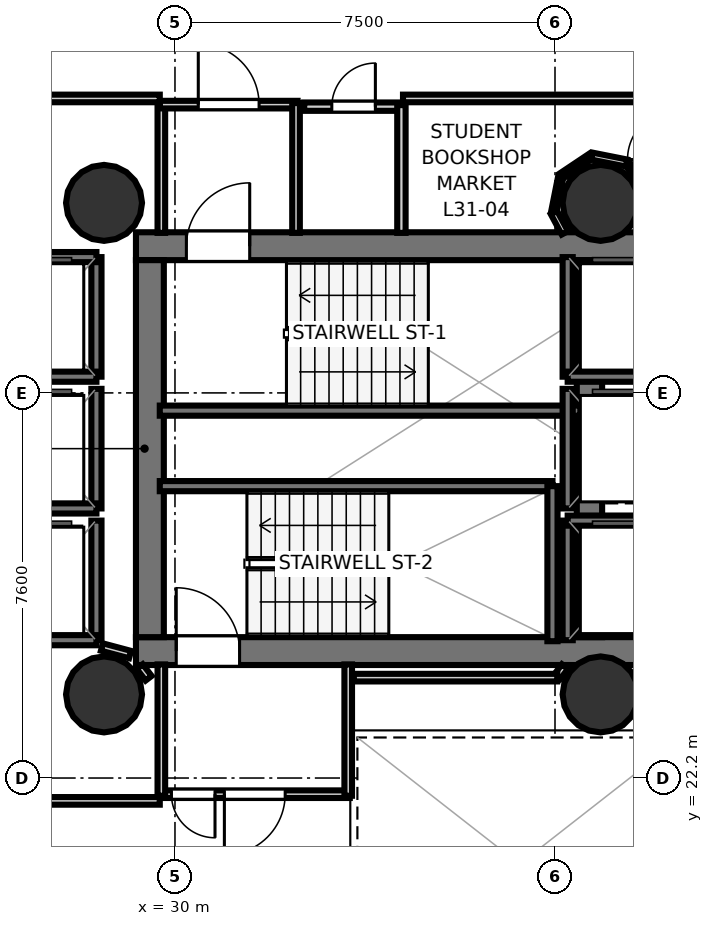
"""IFC4 building model, lengths in metres.
Left out: names, types, materials, properties, quantities, classifications, styles, units other than length and angle.
Written with IfcOpenShell. Run it as: python <this file> out.ifc"""

import sys

from ifc_helpers import new_model, si_unit, direction, frame, frame_2d, origin, origin_2d, place, context, subcontext, project, spatial, rectangle, hollow_circle, extrude, element, fill, save


model = new_model("IFC4")
c1 = context("Model", 3, precision=1e-05, world=origin(), true_north=direction((0.0, 1.0)))
c2 = subcontext(c1, "Body", "Model", "MODEL_VIEW")
j1 = project(units=[si_unit("LENGTHUNIT", "METRE"), si_unit("PLANEANGLEUNIT", "RADIAN")], contexts=[c1])
p1 = place(None, origin())
s1 = spatial("IfcSite", under=j1, at=p1, CompositionType="ELEMENT")
p2 = place(p1, origin())
s2 = spatial("IfcBuilding", under=s1, at=p2, CompositionType="ELEMENT")
p3 = place(p2, frame((0.0, 0.0, 123.7)))
s3 = spatial("IfcBuildingStorey", under=s2, at=p3, CompositionType="ELEMENT", Elevation=123.7)
p4 = place(p3, frame((29.23, 32.695, 0.0), z_axis=(0.0, 0.0, 1.0), x_axis=(1.0, 0.0, 0.0)))
e1 = element("IfcWall", 1, at=p4, inside=s3, PredefinedType="SHEAR", context=c2, shape_type="SweptSolid", body=[
    extrude(rectangle(XDim=10.62, YDim=0.55, at=frame_2d((5.31, 0.0))), origin(), (0.0, 0.0, 1.0), 3.52),
])
p5 = place(p4, frame((0.995, 0.0, 0.0)))
e2 = element("IfcOpeningElement", 2, at=p5, cuts=e1, PredefinedType="OPENING", context=c2, shape_type="SweptSolid", body=[
    extrude(rectangle(XDim=1.25, YDim=2.15, at=frame_2d((0.625, 1.075))), frame((0.0, 0.285, 0.0), z_axis=(0.0, -1.0, 0.0), x_axis=(1.0, 0.0, 0.0)), (0.0, 0.0, 1.0), 0.57),
])
p6 = place(p3, frame((29.23, 24.705, 0.0), z_axis=(0.0, 0.0, 1.0), x_axis=(1.0, 0.0, 0.0)))
e3 = element("IfcWall", 3, at=p6, inside=s3, PredefinedType="SHEAR", context=c2, shape_type="SweptSolid", body=[
    extrude(rectangle(XDim=10.62, YDim=0.55, at=frame_2d((5.31, 0.0))), origin(), (0.0, 0.0, 1.0), 3.52),
])
p7 = place(p6, frame((0.795, 0.0, 0.0)))
e4 = element("IfcOpeningElement", 4, at=p7, cuts=e3, PredefinedType="OPENING", context=c2, shape_type="SweptSolid", body=[
    extrude(rectangle(XDim=1.25, YDim=2.15, at=frame_2d((0.625, 1.075))), frame((0.0, 0.285, 0.0), z_axis=(0.0, -1.0, 0.0), x_axis=(1.0, 0.0, 0.0)), (0.0, 0.0, 1.0), 0.57),
])
p8 = place(p3, frame((29.505, 24.98, 0.0), z_axis=(0.0, 0.0, 1.0), x_axis=(0.0, 1.0, 0.0)))
e5 = element("IfcWall", 5, at=p8, inside=s3, PredefinedType="SHEAR", context=c2, shape_type="SweptSolid", body=[
    extrude(rectangle(XDim=7.44, YDim=0.55, at=frame_2d((3.72, 0.0))), origin(), (0.0, 0.0, 1.0), 3.52),
])
p9 = place(p3, frame((38.18, 24.98, 0.0), z_axis=(0.0, 0.0, 1.0), x_axis=(0.0, 1.0, 0.0)))
e6 = element("IfcWall", 6, at=p9, inside=s3, PredefinedType="SHEAR", context=c2, shape_type="SweptSolid", body=[
    extrude(rectangle(XDim=7.44, YDim=0.5, at=frame_2d((3.72, 0.0))), origin(), (0.0, 0.0, 1.0), 3.52),
])
for number, where, z_axis, x_axis in (
    (7, (28.6, 33.55, 0.0), (0.0, 0.0, 1.0), (1.0, 0.0, 0.0)),
    (8, (28.6, 23.85, 0.0), (0.0, 0.0, 1.0), (1.0, 0.0, 0.0)),
    (9, (38.4, 33.55, 0.0), (0.0, 0.0, 1.0), (1.0, 0.0, 0.0)),
    (10, (38.4, 23.85, 0.0), (0.0, 0.0, 1.0), (1.0, 0.0, 0.0)),
):
    element("IfcColumn", number, at=place(p3, frame(where, z_axis=z_axis, x_axis=x_axis)), inside=s3, PredefinedType="COLUMN", context=c2, shape_type="SweptSolid", body=[
        extrude(hollow_circle(Radius=0.75, WallThickness=0.036, at=origin_2d()), origin(), (0.0, 0.0, 1.0), 3.7),
    ])
p10 = place(p3, frame((29.7, 29.45, 0.0), z_axis=(0.0, 0.0, 1.0), x_axis=(1.0, 0.0, 0.0)))
e11 = element("IfcWall", 11, at=p10, inside=s3, PredefinedType="SOLIDWALL", context=c2, shape_type="SweptSolid", body=[
    extrude(rectangle(XDim=8.3, YDim=0.2, at=frame_2d((4.15, 0.0))), origin(), (0.0, 0.0, 1.0), 3.52),
])
p11 = place(p3, frame((29.7, 27.96, 0.0), z_axis=(0.0, 0.0, 1.0), x_axis=(1.0, 0.0, 0.0)))
e12 = element("IfcWall", 12, at=p11, inside=s3, PredefinedType="SOLIDWALL", context=c2, shape_type="SweptSolid", body=[
    extrude(rectangle(XDim=7.75, YDim=0.2, at=frame_2d((3.875, 0.0))), origin(), (0.0, 0.0, 1.0), 3.52),
])
p12 = place(p3, frame((37.45, 24.9, 0.0), z_axis=(0.0, 0.0, 1.0), x_axis=(0.0, 1.0, 0.0)))
e13 = element("IfcWall", 13, at=p12, inside=s3, PredefinedType="SOLIDWALL", context=c2, shape_type="SweptSolid", body=[
    extrude(rectangle(XDim=3.06, YDim=0.2, at=frame_2d((1.53, 0.0))), origin(), (0.0, 0.0, 1.0), 3.52),
])
p13 = place(p3, frame((37.75, 30.12, 0.0), z_axis=(0.0, 0.0, 1.0), x_axis=(0.0, 1.0, 0.0)))
e14 = element("IfcWall", 14, at=p13, inside=s3, PredefinedType="SOLIDWALL", context=c2, shape_type="SweptSolid", body=[
    extrude(rectangle(XDim=2.36, YDim=0.2, at=frame_2d((1.18, 0.0))), origin(), (0.0, 0.0, 1.0), 3.52),
])
p14 = place(p3, frame((37.75, 30.12, 0.0), z_axis=(0.0, 0.0, 1.0), x_axis=(1.0, 0.0, 0.0)))
e15 = element("IfcWall", 15, at=p14, inside=s3, PredefinedType="SOLIDWALL", context=c2, shape_type="SweptSolid", body=[
    extrude(rectangle(XDim=2.1, YDim=0.2, at=frame_2d((1.05, 0.0))), origin(), (0.0, 0.0, 1.0), 3.52),
])
p15 = place(p3, frame((37.75, 24.92, 0.0), z_axis=(0.0, 0.0, 1.0), x_axis=(0.0, 1.0, 0.0)))
e16 = element("IfcWall", 16, at=p15, inside=s3, PredefinedType="SOLIDWALL", context=c2, shape_type="SweptSolid", body=[
    extrude(rectangle(XDim=2.36, YDim=0.2, at=frame_2d((1.18, 0.0))), origin(), (0.0, 0.0, 1.0), 3.52),
])
p16 = place(p3, frame((37.75, 27.28, 0.0), z_axis=(0.0, 0.0, 1.0), x_axis=(1.0, 0.0, 0.0)))
e17 = element("IfcWall", 17, at=p16, inside=s3, PredefinedType="SOLIDWALL", context=c2, shape_type="SweptSolid", body=[
    extrude(rectangle(XDim=2.1, YDim=0.2, at=frame_2d((1.05, 0.0))), origin(), (0.0, 0.0, 1.0), 3.52),
])
p17 = place(p3, frame((28.45, 30.12, 0.0), z_axis=(0.0, 0.0, 1.0), x_axis=(0.0, 1.0, 0.0)))
e18 = element("IfcWall", 18, at=p17, inside=s3, PredefinedType="SOLIDWALL", context=c2, shape_type="SweptSolid", body=[
    extrude(rectangle(XDim=2.36, YDim=0.2, at=frame_2d((1.18, 0.0))), origin(), (0.0, 0.0, 1.0), 3.52),
])
for number, where, z_axis, x_axis in (
    (19, (26.35, 32.48, 0.0), (0.0, 0.0, 1.0), (1.0, 0.0, 0.0)),
    (20, (26.35, 30.12, 0.0), (0.0, 0.0, 1.0), (1.0, 0.0, 0.0)),
):
    element("IfcWall", number, at=place(p3, frame(where, z_axis=z_axis, x_axis=x_axis)), inside=s3, PredefinedType="SOLIDWALL", context=c2, shape_type="SweptSolid", body=[
        extrude(rectangle(XDim=2.1, YDim=0.2, at=frame_2d((1.05, 0.0))), origin(), (0.0, 0.0, 1.0), 3.52),
    ])
p18 = place(p3, frame((28.45, 27.52, 0.0), z_axis=(0.0, 0.0, 1.0), x_axis=(0.0, 1.0, 0.0)))
e21 = element("IfcWall", 21, at=p18, inside=s3, PredefinedType="SOLIDWALL", context=c2, shape_type="SweptSolid", body=[
    extrude(rectangle(XDim=2.36, YDim=0.2, at=frame_2d((1.18, 0.0))), origin(), (0.0, 0.0, 1.0), 3.52),
])
p19 = place(p3, frame((26.35, 27.52, 0.0), z_axis=(0.0, 0.0, 1.0), x_axis=(1.0, 0.0, 0.0)))
e22 = element("IfcWall", 22, at=p19, inside=s3, PredefinedType="SOLIDWALL", context=c2, shape_type="SweptSolid", body=[
    extrude(rectangle(XDim=2.1, YDim=0.2, at=frame_2d((1.05, 0.0))), origin(), (0.0, 0.0, 1.0), 3.52),
])
p20 = place(p3, frame((28.45, 24.92, 0.0), z_axis=(0.0, 0.0, 1.0), x_axis=(0.0, 1.0, 0.0)))
e23 = element("IfcWall", 23, at=p20, inside=s3, PredefinedType="SOLIDWALL", context=c2, shape_type="SweptSolid", body=[
    extrude(rectangle(XDim=2.36, YDim=0.2, at=frame_2d((1.18, 0.0))), origin(), (0.0, 0.0, 1.0), 3.52),
])
p21 = place(p3, frame((26.35, 24.92, 0.0), z_axis=(0.0, 0.0, 1.0), x_axis=(1.0, 0.0, 0.0)))
e24 = element("IfcWall", 24, at=p21, inside=s3, PredefinedType="SOLIDWALL", context=c2, shape_type="SweptSolid", body=[
    extrude(rectangle(XDim=2.1, YDim=0.2, at=frame_2d((1.05, 0.0))), origin(), (0.0, 0.0, 1.0), 3.52),
])
p22 = place(p3, frame((37.75, 27.52, 0.0), z_axis=(0.0, 0.0, 1.0), x_axis=(0.0, 1.0, 0.0)))
e25 = element("IfcWall", 25, at=p22, inside=s3, PredefinedType="SOLIDWALL", context=c2, shape_type="SweptSolid", body=[
    extrude(rectangle(XDim=2.36, YDim=0.2, at=frame_2d((1.18, 0.0))), origin(), (0.0, 0.0, 1.0), 3.52),
])
p23 = place(p3, frame((29.731, 32.958, 0.0), z_axis=(0.0, 0.0, 1.0), x_axis=(0.0, 1.0, 0.0)))
e26 = element("IfcWall", 26, at=p23, inside=s3, PredefinedType="PARTITIONING", context=c2, shape_type="SweptSolid", body=[
    extrude(rectangle(XDim=2.562, YDim=0.15, at=frame_2d((1.281, 0.0))), origin(), (0.0, 0.0, 1.0), 2.84),
])
p24 = place(p3, frame((29.7, 35.489, 0.0), z_axis=(0.0, 0.0, 1.0), x_axis=(1.0, 0.0, 0.0)))
e27 = element("IfcWall", 27, at=p24, inside=s3, PredefinedType="PARTITIONING", context=c2, shape_type="SweptSolid", body=[
    extrude(rectangle(XDim=2.72, YDim=0.15, at=frame_2d((1.36, 0.0))), origin(), (0.0, 0.0, 1.0), 2.84),
])
p25 = place(p24, frame((0.76, 0.0, 0.0)))
e28 = element("IfcOpeningElement", 28, at=p25, cuts=e27, PredefinedType="OPENING", context=c2, shape_type="SweptSolid", body=[
    extrude(rectangle(XDim=1.2, YDim=2.15, at=frame_2d((0.6, 1.075))), frame((0.0, 0.085, 0.0), z_axis=(0.0, -1.0, 0.0), x_axis=(1.0, 0.0, 0.0)), (0.0, 0.0, 1.0), 0.17),
])
p26 = place(p3, frame((32.389, 35.52, 0.0), z_axis=(0.0, 0.0, 1.0), x_axis=(0.0, -1.0, 0.0)))
e29 = element("IfcWall", 29, at=p26, inside=s3, PredefinedType="PARTITIONING", context=c2, shape_type="SweptSolid", body=[
    extrude(rectangle(XDim=2.562, YDim=0.15, at=frame_2d((1.281, 0.0))), origin(), (0.0, 0.0, 1.0), 2.84),
])
p27 = place(p3, frame((33.45, 21.881, 0.0), z_axis=(0.0, 0.0, 1.0), x_axis=(-1.0, 0.0, 0.0)))
e30 = element("IfcWall", 30, at=p27, inside=s3, PredefinedType="PARTITIONING", context=c2, shape_type="SweptSolid", body=[
    extrude(rectangle(XDim=3.75, YDim=0.15, at=frame_2d((1.875, 0.0))), origin(), (0.0, 0.0, 1.0), 2.84),
])
p28 = place(p27, frame((1.275, 0.0, 0.0)))
e31 = element("IfcOpeningElement", 31, at=p28, cuts=e30, PredefinedType="OPENING", context=c2, shape_type="SweptSolid", body=[
    extrude(rectangle(XDim=1.2, YDim=2.15, at=frame_2d((0.6, 1.075))), frame((0.0, 0.085, 0.0), z_axis=(0.0, -1.0, 0.0), x_axis=(1.0, 0.0, 0.0)), (0.0, 0.0, 1.0), 0.17),
])
p29 = place(p27, frame((2.66, 0.0, 0.0)))
e32 = element("IfcOpeningElement", 32, at=p29, cuts=e30, PredefinedType="OPENING", context=c2, shape_type="SweptSolid", body=[
    extrude(rectangle(XDim=0.86, YDim=2.05, at=frame_2d((0.43, 1.025))), frame((0.0, 0.085, 0.0), z_axis=(0.0, -1.0, 0.0), x_axis=(1.0, 0.0, 0.0)), (0.0, 0.0, 1.0), 0.17),
])
for number, where, z_axis, x_axis in (
    (33, (29.731, 21.85, 0.0), (0.0, 0.0, 1.0), (0.0, 1.0, 0.0)),
    (34, (33.419, 24.442, 0.0), (0.0, 0.0, 1.0), (0.0, -1.0, 0.0)),
):
    element("IfcWall", number, at=place(p3, frame(where, z_axis=z_axis, x_axis=x_axis)), inside=s3, PredefinedType="PARTITIONING", context=c2, shape_type="SweptSolid", body=[
        extrude(rectangle(XDim=2.592, YDim=0.15, at=frame_2d((1.296, 0.0))), origin(), (0.0, 0.0, 1.0), 2.84),
    ])
p30 = place(p3, frame((32.55, 35.449, 0.0), z_axis=(0.0, 0.0, 1.0), x_axis=(1.0, 0.0, 0.0)))
e35 = element("IfcWall", 35, at=p30, inside=s3, PredefinedType="PLUMBINGWALL", context=c2, shape_type="SweptSolid", body=[
    extrude(rectangle(XDim=1.95, YDim=0.165, at=frame_2d((0.975, 0.0))), origin(), (0.0, 0.0, 1.0), 2.84),
])
p31 = place(p30, frame((0.545, 0.0, 0.0)))
e36 = element("IfcOpeningElement", 36, at=p31, cuts=e35, PredefinedType="OPENING", context=c2, shape_type="SweptSolid", body=[
    extrude(rectangle(XDim=0.86, YDim=2.05, at=frame_2d((0.43, 1.025))), frame((0.0, 0.093, 0.0), z_axis=(0.0, -1.0, 0.0), x_axis=(1.0, 0.0, 0.0)), (0.0, 0.0, 1.0), 0.185),
])
p32 = place(p3, frame((34.469, 35.48, 0.0), z_axis=(0.0, 0.0, 1.0), x_axis=(0.0, -1.0, 0.0)))
e37 = element("IfcWall", 37, at=p32, inside=s3, PredefinedType="PLUMBINGWALL", context=c2, shape_type="SweptSolid", body=[
    extrude(rectangle(XDim=2.522, YDim=0.165, at=frame_2d((1.261, 0.0))), origin(), (0.0, 0.0, 1.0), 2.84),
])
p33 = place(p3, frame((29.48, 24.169, 0.0), z_axis=(0.0, 0.0, 1.0), x_axis=(-0.608043045279, 0.79390405912, 0.0)))
e38 = element("IfcWall", 38, at=p33, inside=s3, PredefinedType="PARTITIONING", context=c2, shape_type="SweptSolid", body=[
    extrude(rectangle(XDim=0.29, YDim=0.15, at=frame_2d((0.145, 0.0))), origin(), (0.0, 0.0, 1.0), 2.84),
])
p34 = place(p3, frame((29.114, 24.637, 0.0), z_axis=(0.0, 0.0, 1.0), x_axis=(-0.966199685486, 0.257794817183, 0.0)))
e39 = element("IfcWall", 39, at=p34, inside=s3, PredefinedType="PARTITIONING", context=c2, shape_type="SweptSolid", body=[
    extrude(rectangle(XDim=0.575, YDim=0.15, at=frame_2d((0.288, 0.0))), origin(), (0.0, 0.0, 1.0), 2.84),
])
p35 = place(p3, frame((37.697, 24.399, 0.0), z_axis=(0.0, 0.0, 1.0), x_axis=(-0.60763139403, -0.794219169367, 0.0)))
e40 = element("IfcWall", 40, at=p35, inside=s3, PredefinedType="PARTITIONING", context=c2, shape_type="SweptSolid", body=[
    extrude(rectangle(XDim=0.25, YDim=0.15, at=frame_2d((0.125, 0.0))), origin(), (0.0, 0.0, 1.0), 2.84),
])
p36 = place(p3, frame((37.545, 24.181, 0.0), z_axis=(0.0, 0.0, 1.0), x_axis=(-1.0, 0.0, 0.0)))
e41 = element("IfcWall", 41, at=p36, inside=s3, PredefinedType="PARTITIONING", context=c2, shape_type="SweptSolid", body=[
    extrude(rectangle(XDim=4.015, YDim=0.15, at=frame_2d((2.007, 0.0))), origin(), (0.0, 0.0, 1.0), 2.84),
])
p37 = place(p3, frame((39.818, 35.611, 0.0), z_axis=(0.0, 0.0, 1.0), x_axis=(-1.0, 0.0, 0.0)))
e42 = element("IfcWall", 42, at=p37, inside=s3, PredefinedType="PARTITIONING", context=c2, shape_type="SweptSolid", body=[
    extrude(rectangle(XDim=5.318, YDim=0.15, at=frame_2d((2.659, 0.0))), origin(), (0.0, 0.0, 1.0), 2.84),
])
for number, where, z_axis, x_axis in (
    (43, (29.7, 35.611, 0.0), (0.0, 0.0, 1.0), (-1.0, 0.0, 0.0)),
    (44, (26.42, 21.749, 0.0), (0.0, 0.0, 1.0), (1.0, 0.0, 0.0)),
):
    element("IfcWall", number, at=place(p3, frame(where, z_axis=z_axis, x_axis=x_axis)), inside=s3, PredefinedType="PARTITIONING", context=c2, shape_type="SweptSolid", body=[
        extrude(rectangle(XDim=3.28, YDim=0.15, at=frame_2d((1.64, 0.0))), origin(), (0.0, 0.0, 1.0), 2.84),
    ])
p38 = place(p3, frame((39.317, 33.748, 0.0), z_axis=(0.0, 0.0, 1.0), x_axis=(-0.556649926744, 0.830747169153, 0.0)))
e45 = element("IfcWall", 45, at=p38, inside=s3, PredefinedType="PARTITIONING", context=c2, shape_type="SweptSolid", body=[
    extrude(rectangle(XDim=0.693, YDim=0.105, at=frame_2d((0.346, 0.0))), origin(), (0.0, 0.0, 1.0), 2.84),
])
p39 = place(p3, frame((38.912, 34.337, 0.0), z_axis=(0.0, 0.0, 1.0), x_axis=(-0.98075554424, 0.195239756305, 0.0)))
e46 = element("IfcWall", 46, at=p39, inside=s3, PredefinedType="PARTITIONING", context=c2, shape_type="SweptSolid", body=[
    extrude(rectangle(XDim=0.697, YDim=0.14, at=frame_2d((0.348, 0.0))), origin(), (0.0, 0.0, 1.0), 2.84),
])
p40 = place(p3, frame((38.205, 34.468, 0.0), z_axis=(0.0, 0.0, 1.0), x_axis=(-0.831348365513, -0.555751648814, 0.0)))
e47 = element("IfcWall", 47, at=p40, inside=s3, PredefinedType="PARTITIONING", context=c2, shape_type="SweptSolid", body=[
    extrude(rectangle(XDim=0.696, YDim=0.12, at=frame_2d((0.348, 0.0))), origin(), (0.0, 0.0, 1.0), 2.84),
])
p41 = place(p3, frame((37.613, 34.062, 0.0), z_axis=(0.0, 0.0, 1.0), x_axis=(-0.195239756305, -0.98075554424, 0.0)))
e48 = element("IfcWall", 48, at=p41, inside=s3, PredefinedType="PARTITIONING", context=c2, shape_type="SweptSolid", body=[
    extrude(rectangle(XDim=0.697, YDim=0.105, at=frame_2d((0.348, 0.0))), origin(), (0.0, 0.0, 1.0), 2.84),
])
p42 = place(p3, frame((37.48, 33.358, 0.0), z_axis=(0.0, 0.0, 1.0), x_axis=(0.471593841364, -0.881815881455, 0.0)))
e49 = element("IfcWall", 49, at=p42, inside=s3, PredefinedType="PARTITIONING", context=c2, shape_type="SweptSolid", body=[
    extrude(rectangle(XDim=0.454, YDim=0.14, at=frame_2d((0.227, 0.0))), origin(), (0.0, 0.0, 1.0), 2.84),
])
p43 = place(p5, origin())
e50 = element("IfcDoor", 50, at=p43, inside=s3, OperationType="SINGLE_SWING_RIGHT", PredefinedType="DOOR", context=c2, shape_type="SweptSolid", body=[
    extrude(rectangle(XDim=1.25, YDim=2.15, at=frame_2d((0.625, 1.075))), frame((0.0, 0.025, 0.0), z_axis=(0.0, -1.0, 0.0), x_axis=(1.0, 0.0, 0.0)), (0.0, 0.0, 1.0), 0.05),
])
fill(e2, e50)
p44 = place(p7, origin())
e51 = element("IfcDoor", 51, at=p44, inside=s3, OperationType="SINGLE_SWING_LEFT", PredefinedType="DOOR", context=c2, shape_type="SweptSolid", body=[
    extrude(rectangle(XDim=1.25, YDim=2.15, at=frame_2d((0.625, 1.075))), frame((0.0, 0.025, 0.0), z_axis=(0.0, -1.0, 0.0), x_axis=(1.0, 0.0, 0.0)), (0.0, 0.0, 1.0), 0.05),
])
fill(e4, e51)
p45 = place(p25, origin())
e52 = element("IfcDoor", 52, at=p45, inside=s3, OperationType="SINGLE_SWING_LEFT", PredefinedType="DOOR", context=c2, shape_type="SweptSolid", body=[
    extrude(rectangle(XDim=1.2, YDim=2.15, at=frame_2d((0.6, 1.075))), frame((0.0, 0.025, 0.0), z_axis=(0.0, -1.0, 0.0), x_axis=(1.0, 0.0, 0.0)), (0.0, 0.0, 1.0), 0.05),
])
fill(e28, e52)
p46 = place(p28, origin())
e53 = element("IfcDoor", 53, at=p46, inside=s3, OperationType="SINGLE_SWING_RIGHT", PredefinedType="DOOR", context=c2, shape_type="SweptSolid", body=[
    extrude(rectangle(XDim=1.2, YDim=2.15, at=frame_2d((0.6, 1.075))), frame((0.0, 0.025, 0.0), z_axis=(0.0, -1.0, 0.0), x_axis=(1.0, 0.0, 0.0)), (0.0, 0.0, 1.0), 0.05),
])
fill(e31, e53)
p47 = place(p31, origin())
e54 = element("IfcDoor", 54, at=p47, inside=s3, OperationType="SINGLE_SWING_RIGHT", PredefinedType="DOOR", context=c2, shape_type="SweptSolid", body=[
    extrude(rectangle(XDim=0.86, YDim=2.05, at=frame_2d((0.43, 1.025))), frame((0.0, 0.025, 0.0), z_axis=(0.0, -1.0, 0.0), x_axis=(1.0, 0.0, 0.0)), (0.0, 0.0, 1.0), 0.05),
])
fill(e36, e54)
p48 = place(p29, origin())
e55 = element("IfcDoor", 55, at=p48, inside=s3, OperationType="SINGLE_SWING_LEFT", PredefinedType="DOOR", context=c2, shape_type="SweptSolid", body=[
    extrude(rectangle(XDim=0.86, YDim=2.05, at=frame_2d((0.43, 1.025))), frame((0.0, 0.025, 0.0), z_axis=(0.0, -1.0, 0.0), x_axis=(1.0, 0.0, 0.0)), (0.0, 0.0, 1.0), 0.05),
])
fill(e32, e55)
save(model, sys.argv[1])
